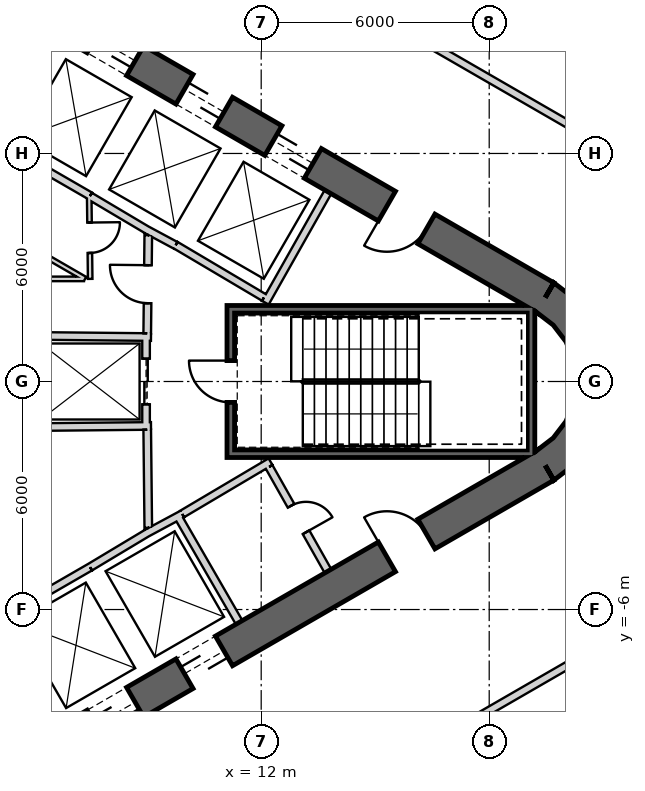
"""IFC4 building model, lengths in metres.
Left out: names, types, materials, properties, quantities, classifications, styles, units other than length and angle.
Written with IfcOpenShell. Run it as: python <this file> out.ifc"""

import sys

from ifc_helpers import new_model, si_unit, direction, frame, frame_2d, origin, place, context, subcontext, project, spatial, polyline, rectangle, outline, extrude, element, fill, save


model = new_model("IFC4")
c1 = context("Model", 3, precision=1e-05, world=origin(), true_north=direction((0.0, 1.0)))
c2 = subcontext(c1, "Body", "Model", "MODEL_VIEW")
j1 = project(units=[si_unit("LENGTHUNIT", "METRE"), si_unit("PLANEANGLEUNIT", "RADIAN")], contexts=[c1])
p1 = place(None, origin())
s1 = spatial("IfcSite", under=j1, at=p1, CompositionType="ELEMENT")
p2 = place(p1, origin())
s2 = spatial("IfcBuilding", under=s1, at=p2, CompositionType="ELEMENT")
p3 = place(p2, frame((0.0, 0.0, 107.0)))
s3 = spatial("IfcBuildingStorey", under=s2, at=p3, CompositionType="ELEMENT", Elevation=107.0)
p4 = place(p3, frame((19.475, 2.208, 0.0), z_axis=(0.0, 0.0, 1.0), x_axis=(-0.866028369851, 0.499994862586, 0.0)))
e1 = element("IfcWall", 1, at=p4, inside=s3, PredefinedType="SHEAR", context=c2, shape_type="SweptSolid", body=[
    extrude(rectangle(XDim=31.523, YDim=0.9, at=frame_2d((15.762, 0.0))), origin(), (0.0, 0.0, 1.0), 4.1),
])
p5 = place(p4, frame((7.062, 0.0, 0.0)))
e2 = element("IfcOpeningElement", 2, at=p5, cuts=e1, PredefinedType="OPENING", context=c2, shape_type="SweptSolid", body=[
    extrude(rectangle(XDim=1.2, YDim=2.4, at=frame_2d((0.6, 1.2))), frame((0.0, 0.46, 0.0), z_axis=(0.0, -1.0, 0.0), x_axis=(1.0, 0.0, 0.0)), (0.0, 0.0, 1.0), 0.92),
])
p6 = place(p4, frame((9.762, 0.0, 0.0)))
e3 = element("IfcOpeningElement", 3, at=p6, cuts=e1, PredefinedType="OPENING", context=c2, shape_type="SweptSolid", body=[
    extrude(rectangle(XDim=1.2, YDim=2.4, at=frame_2d((0.6, 1.2))), frame((0.0, 0.46, 0.0), z_axis=(0.0, -1.0, 0.0), x_axis=(1.0, 0.0, 0.0)), (0.0, 0.0, 1.0), 0.92),
])
p7 = place(p4, frame((12.462, 0.0, 0.0)))
e4 = element("IfcOpeningElement", 4, at=p7, cuts=e1, PredefinedType="OPENING", context=c2, shape_type="SweptSolid", body=[
    extrude(rectangle(XDim=1.2, YDim=2.4, at=frame_2d((0.6, 1.2))), frame((0.0, 0.46, 0.0), z_axis=(0.0, -1.0, 0.0), x_axis=(1.0, 0.0, 0.0)), (0.0, 0.0, 1.0), 0.92),
])
p8 = place(p4, frame((15.162, 0.0, 0.0)))
e5 = element("IfcOpeningElement", 5, at=p8, cuts=e1, PredefinedType="OPENING", context=c2, shape_type="SweptSolid", body=[
    extrude(rectangle(XDim=1.2, YDim=2.4, at=frame_2d((0.6, 1.2))), frame((0.0, 0.46, 0.0), z_axis=(0.0, -1.0, 0.0), x_axis=(1.0, 0.0, 0.0)), (0.0, 0.0, 1.0), 0.92),
])
p9 = place(p4, frame((17.862, 0.0, 0.0)))
e6 = element("IfcOpeningElement", 6, at=p9, cuts=e1, PredefinedType="OPENING", context=c2, shape_type="SweptSolid", body=[
    extrude(rectangle(XDim=1.2, YDim=2.4, at=frame_2d((0.6, 1.2))), frame((0.0, 0.46, 0.0), z_axis=(0.0, -1.0, 0.0), x_axis=(1.0, 0.0, 0.0)), (0.0, 0.0, 1.0), 0.92),
])
p10 = place(p4, frame((20.562, 0.0, 0.0)))
e7 = element("IfcOpeningElement", 7, at=p10, cuts=e1, PredefinedType="OPENING", context=c2, shape_type="SweptSolid", body=[
    extrude(rectangle(XDim=1.2, YDim=2.4, at=frame_2d((0.6, 1.2))), frame((0.0, 0.46, 0.0), z_axis=(0.0, -1.0, 0.0), x_axis=(1.0, 0.0, 0.0)), (0.0, 0.0, 1.0), 0.92),
])
p11 = place(p4, frame((23.262, 0.0, 0.0)))
e8 = element("IfcOpeningElement", 8, at=p11, cuts=e1, PredefinedType="OPENING", context=c2, shape_type="SweptSolid", body=[
    extrude(rectangle(XDim=1.2, YDim=2.4, at=frame_2d((0.6, 1.2))), frame((0.0, 0.46, 0.0), z_axis=(0.0, -1.0, 0.0), x_axis=(1.0, 0.0, 0.0)), (0.0, 0.0, 1.0), 0.92),
])
p12 = place(p4, frame((3.612, 0.0, 0.0)))
e9 = element("IfcOpeningElement", 9, at=p12, cuts=e1, PredefinedType="OPENING", context=c2, shape_type="SweptSolid", body=[
    extrude(rectangle(XDim=1.2, YDim=2.4, at=frame_2d((0.6, 1.2))), frame((0.0, 0.46, 0.0), z_axis=(0.0, -1.0, 0.0), x_axis=(1.0, 0.0, 0.0)), (0.0, 0.0, 1.0), 0.92),
])
p13 = place(p4, frame((26.712, 0.0, 0.0)))
e10 = element("IfcOpeningElement", 10, at=p13, cuts=e1, PredefinedType="OPENING", context=c2, shape_type="SweptSolid", body=[
    extrude(rectangle(XDim=1.2, YDim=2.4, at=frame_2d((0.6, 1.2))), frame((0.0, 0.46, 0.0), z_axis=(0.0, -1.0, 0.0), x_axis=(1.0, 0.0, 0.0)), (0.0, 0.0, 1.0), 0.92),
])
p14 = place(p3, frame((-7.825, -17.97, 0.0), z_axis=(0.0, 0.0, 1.0), x_axis=(0.866028369851, 0.499994862586, 0.0)))
e11 = element("IfcWall", 11, at=p14, inside=s3, PredefinedType="SHEAR", context=c2, shape_type="SweptSolid", body=[
    extrude(rectangle(XDim=31.523, YDim=0.9, at=frame_2d((15.762, 0.0))), origin(), (0.0, 0.0, 1.0), 4.1),
])
p15 = place(p14, frame((7.062, 0.0, 0.0)))
e12 = element("IfcOpeningElement", 12, at=p15, cuts=e11, PredefinedType="OPENING", context=c2, shape_type="SweptSolid", body=[
    extrude(rectangle(XDim=1.2, YDim=2.4, at=frame_2d((0.6, 1.2))), frame((0.0, 0.46, 0.0), z_axis=(0.0, -1.0, 0.0), x_axis=(1.0, 0.0, 0.0)), (0.0, 0.0, 1.0), 0.92),
])
p16 = place(p14, frame((9.762, 0.0, 0.0)))
e13 = element("IfcOpeningElement", 13, at=p16, cuts=e11, PredefinedType="OPENING", context=c2, shape_type="SweptSolid", body=[
    extrude(rectangle(XDim=1.2, YDim=2.4, at=frame_2d((0.6, 1.2))), frame((0.0, 0.46, 0.0), z_axis=(0.0, -1.0, 0.0), x_axis=(1.0, 0.0, 0.0)), (0.0, 0.0, 1.0), 0.92),
])
p17 = place(p14, frame((12.462, 0.0, 0.0)))
e14 = element("IfcOpeningElement", 14, at=p17, cuts=e11, PredefinedType="OPENING", context=c2, shape_type="SweptSolid", body=[
    extrude(rectangle(XDim=1.2, YDim=2.4, at=frame_2d((0.6, 1.2))), frame((0.0, 0.46, 0.0), z_axis=(0.0, -1.0, 0.0), x_axis=(1.0, 0.0, 0.0)), (0.0, 0.0, 1.0), 0.92),
])
p18 = place(p14, frame((15.162, 0.0, 0.0)))
e15 = element("IfcOpeningElement", 15, at=p18, cuts=e11, PredefinedType="OPENING", context=c2, shape_type="SweptSolid", body=[
    extrude(rectangle(XDim=1.2, YDim=2.4, at=frame_2d((0.6, 1.2))), frame((0.0, 0.46, 0.0), z_axis=(0.0, -1.0, 0.0), x_axis=(1.0, 0.0, 0.0)), (0.0, 0.0, 1.0), 0.92),
])
p19 = place(p14, frame((17.862, 0.0, 0.0)))
e16 = element("IfcOpeningElement", 16, at=p19, cuts=e11, PredefinedType="OPENING", context=c2, shape_type="SweptSolid", body=[
    extrude(rectangle(XDim=1.2, YDim=2.4, at=frame_2d((0.6, 1.2))), frame((0.0, 0.46, 0.0), z_axis=(0.0, -1.0, 0.0), x_axis=(1.0, 0.0, 0.0)), (0.0, 0.0, 1.0), 0.92),
])
p20 = place(p14, frame((20.562, 0.0, 0.0)))
e17 = element("IfcOpeningElement", 17, at=p20, cuts=e11, PredefinedType="OPENING", context=c2, shape_type="SweptSolid", body=[
    extrude(rectangle(XDim=1.2, YDim=2.4, at=frame_2d((0.6, 1.2))), frame((0.0, 0.46, 0.0), z_axis=(0.0, -1.0, 0.0), x_axis=(1.0, 0.0, 0.0)), (0.0, 0.0, 1.0), 0.92),
])
p21 = place(p14, frame((26.712, 0.0, 0.0)))
e18 = element("IfcOpeningElement", 18, at=p21, cuts=e11, PredefinedType="OPENING", context=c2, shape_type="SweptSolid", body=[
    extrude(rectangle(XDim=1.2, YDim=2.4, at=frame_2d((0.6, 1.2))), frame((0.0, 0.46, 0.0), z_axis=(0.0, -1.0, 0.0), x_axis=(1.0, 0.0, 0.0)), (0.0, 0.0, 1.0), 0.92),
])
p22 = place(p14, frame((3.612, 0.0, 0.0)))
e19 = element("IfcOpeningElement", 19, at=p22, cuts=e11, PredefinedType="OPENING", context=c2, shape_type="SweptSolid", body=[
    extrude(rectangle(XDim=1.2, YDim=2.4, at=frame_2d((0.6, 1.2))), frame((0.0, 0.46, 0.0), z_axis=(0.0, -1.0, 0.0), x_axis=(1.0, 0.0, 0.0)), (0.0, 0.0, 1.0), 0.92),
])
p23 = place(p3, origin())
e20 = element("IfcWall", 20, at=p23, inside=s3, PredefinedType="SHEAR", context=c2, shape_type="SweptSolid", body=[
    extrude(outline(polyline([(19.7, -2.598), (20.321, -2.121), (20.798, -1.5), (21.098, -0.777), (21.2, 0.0), (21.098, 0.777), (20.798, 1.5), (20.321, 2.121), (19.7, 2.598), (19.25, 1.819), (19.685, 1.485), (20.019, 1.05), (20.229, 0.543), (20.3, 0.0), (20.229, -0.543), (20.019, -1.05), (19.685, -1.485), (19.25, -1.819), (19.7, -2.598)])), origin(), (0.0, 0.0, 1.0), 4.1),
])
p24 = place(p3, frame((7.497, 4.886, 0.0), z_axis=(0.0, 0.0, 1.0), x_axis=(-0.866030989016, 0.499990325971, 0.0)))
e21 = element("IfcWall", 21, at=p24, inside=s3, PredefinedType="PLUMBINGWALL", context=c2, shape_type="SweptSolid", body=[
    extrude(rectangle(XDim=8.1, YDim=0.2, at=frame_2d((4.05, 0.0))), origin(), (0.0, 0.0, 1.0), 3.8),
])
p25 = place(p3, frame((12.11, 2.073, 0.0), z_axis=(0.0, 0.0, 1.0), x_axis=(0.49196600604, 0.870614408852, 0.0)))
e22 = element("IfcWall", 22, at=p25, inside=s3, PredefinedType="PLUMBINGWALL", context=c2, shape_type="SweptSolid", body=[
    extrude(rectangle(XDim=3.35, YDim=0.2, at=frame_2d((1.675, 0.0))), origin(), (0.0, 0.0, 1.0), 3.8),
])
p26 = place(p3, frame((12.073, 2.211, 0.0), z_axis=(0.0, 0.0, 1.0), x_axis=(-0.860438357912, 0.509554542943, 0.0)))
e23 = element("IfcWall", 23, at=p26, inside=s3, PredefinedType="PLUMBINGWALL", context=c2, shape_type="SweptSolid", body=[
    extrude(rectangle(XDim=2.7, YDim=0.2, at=frame_2d((1.35, 0.0))), origin(), (0.0, 0.0, 1.0), 3.8),
])
p27 = place(p3, frame((9.748, 3.583, 0.0), z_axis=(0.0, 0.0, 1.0), x_axis=(-0.880917147855, 0.473270513147, 0.0)))
e24 = element("IfcWall", 24, at=p27, inside=s3, PredefinedType="PLUMBINGWALL", context=c2, shape_type="SweptSolid", body=[
    extrude(rectangle(XDim=0.878, YDim=0.2, at=frame_2d((0.439, 0.0))), origin(), (0.0, 0.0, 1.0), 3.8),
])
p28 = place(p3, frame((9.08, 3.937, 0.0), z_axis=(0.0, 0.0, 1.0), x_axis=(-0.859981807212, 0.510324691999, 0.0)))
e25 = element("IfcWall", 25, at=p28, inside=s3, PredefinedType="PLUMBINGWALL", context=c2, shape_type="SweptSolid", body=[
    extrude(rectangle(XDim=1.845, YDim=0.2, at=frame_2d((0.922, 0.0))), origin(), (0.0, 0.0, 1.0), 3.8),
])
p29 = place(p3, frame((0.483, -8.936, 0.0), z_axis=(0.0, 0.0, 1.0), x_axis=(0.866030989016, 0.499990325971, 0.0)))
e26 = element("IfcWall", 26, at=p29, inside=s3, PredefinedType="PLUMBINGWALL", context=c2, shape_type="SweptSolid", body=[
    extrude(rectangle(XDim=8.1, YDim=0.2, at=frame_2d((4.05, 0.0))), origin(), (0.0, 0.0, 1.0), 3.8),
])
p30 = place(p3, frame((9.795, -3.525, 0.0), z_axis=(0.0, 0.0, 1.0), x_axis=(0.499984717929, -0.866034226713, 0.0)))
e27 = element("IfcWall", 27, at=p30, inside=s3, PredefinedType="PLUMBINGWALL", context=c2, shape_type="SweptSolid", body=[
    extrude(rectangle(XDim=3.25, YDim=0.2, at=frame_2d((1.625, 0.0))), origin(), (0.0, 0.0, 1.0), 3.8),
])
p31 = place(p3, frame((8.974, -3.999, 0.0), z_axis=(0.0, 0.0, 1.0), x_axis=(0.880907015104, 0.473289373154, 0.0)))
e28 = element("IfcWall", 28, at=p31, inside=s3, PredefinedType="PLUMBINGWALL", context=c2, shape_type="SweptSolid", body=[
    extrude(rectangle(XDim=1.078, YDim=0.2, at=frame_2d((0.539, 0.0))), origin(), (0.0, 0.0, 1.0), 3.8),
])
p32 = place(p3, frame((7.497, -4.886, 0.0), z_axis=(0.0, 0.0, 1.0), x_axis=(0.857516281273, 0.51445682749, 0.0)))
e29 = element("IfcWall", 29, at=p32, inside=s3, PredefinedType="PLUMBINGWALL", context=c2, shape_type="SweptSolid", body=[
    extrude(rectangle(XDim=1.845, YDim=0.2, at=frame_2d((0.922, 0.0))), origin(), (0.0, 0.0, 1.0), 3.8),
])
p33 = place(p3, frame((19.2, 1.9, -0.3), z_axis=(0.0, 0.0, 1.0), x_axis=(-1.0, 0.0, 0.0)))
e30 = element("IfcWall", 30, at=p33, inside=s3, PredefinedType="SHEAR", context=c2, shape_type="SweptSolid", body=[
    extrude(rectangle(XDim=8.1, YDim=0.2, at=frame_2d((4.05, 0.0))), origin(), (0.0, 0.0, 1.0), 4.1),
])
p34 = place(p3, frame((19.1, -2.0, -0.3), z_axis=(0.0, 0.0, 1.0), x_axis=(0.0, 1.0, 0.0)))
e31 = element("IfcWall", 31, at=p34, inside=s3, PredefinedType="SHEAR", context=c2, shape_type="SweptSolid", body=[
    extrude(rectangle(XDim=3.8, YDim=0.2, at=frame_2d((1.9, 0.0))), origin(), (0.0, 0.0, 1.0), 4.1),
])
p35 = place(p3, frame((11.1, -1.9, -0.3), z_axis=(0.0, 0.0, 1.0), x_axis=(1.0, 0.0, 0.0)))
e32 = element("IfcWall", 32, at=p35, inside=s3, PredefinedType="SHEAR", context=c2, shape_type="SweptSolid", body=[
    extrude(rectangle(XDim=7.9, YDim=0.2, at=frame_2d((3.95, 0.0))), origin(), (0.0, 0.0, 1.0), 4.1),
])
p36 = place(p3, frame((11.2, -1.8, -0.3), z_axis=(0.0, 0.0, 1.0), x_axis=(0.0, 1.0, 0.0)))
e33 = element("IfcWall", 33, at=p36, inside=s3, PredefinedType="SHEAR", context=c2, shape_type="SweptSolid", body=[
    extrude(rectangle(XDim=3.6, YDim=0.2, at=frame_2d((1.8, 0.0))), origin(), (0.0, 0.0, 1.0), 4.1),
])
p37 = place(p36, frame((1.25, 0.0, 0.3)))
e34 = element("IfcOpeningElement", 34, at=p37, cuts=e33, PredefinedType="OPENING", context=c2, shape_type="SweptSolid", body=[
    extrude(rectangle(XDim=1.1, YDim=2.1, at=frame_2d((0.55, 1.05))), frame((0.0, 0.11, 0.0), z_axis=(0.0, -1.0, 0.0), x_axis=(1.0, 0.0, 0.0)), (0.0, 0.0, 1.0), 0.22),
])
p38 = place(p3, frame((8.97, 1.2, 0.0), z_axis=(0.0, 0.0, 1.0), x_axis=(0.0, -1.0, 0.0)))
e35 = element("IfcWall", 35, at=p38, inside=s3, PredefinedType="PLUMBINGWALL", context=c2, shape_type="SweptSolid", body=[
    extrude(rectangle(XDim=2.4, YDim=0.2, at=frame_2d((1.2, 0.0))), origin(), (0.0, 0.0, 1.0), 3.8),
])
p39 = place(p38, frame((0.6, 0.0, 0.0)))
e36 = element("IfcOpeningElement", 36, at=p39, cuts=e35, PredefinedType="OPENING", context=c2, shape_type="SweptSolid", body=[
    extrude(rectangle(XDim=1.2, YDim=2.4, at=frame_2d((0.6, 1.2))), frame((0.0, 0.11, 0.0), z_axis=(0.0, -1.0, 0.0), x_axis=(1.0, 0.0, 0.0)), (0.0, 0.0, 1.0), 0.22),
])
p40 = place(p3, frame((9.1, -1.169, 0.0), z_axis=(0.0, 0.0, 1.0), x_axis=(-0.999949988, -0.010001074852, 0.0)))
e37 = element("IfcWall", 37, at=p40, inside=s3, PredefinedType="PLUMBINGWALL", context=c2, shape_type="SweptSolid", body=[
    extrude(rectangle(XDim=3.1, YDim=0.2, at=frame_2d((1.55, 0.0))), origin(), (0.0, 0.0, 1.0), 3.8),
])
p41 = place(p3, frame((9.1, 1.169, 0.0), z_axis=(0.0, 0.0, 1.0), x_axis=(-0.99994990606, 0.010009264196, 0.0)))
e38 = element("IfcWall", 38, at=p41, inside=s3, PredefinedType="PLUMBINGWALL", context=c2, shape_type="SweptSolid", body=[
    extrude(rectangle(XDim=3.0, YDim=0.2, at=frame_2d((1.5, 0.0))), origin(), (0.0, 0.0, 1.0), 3.8),
])
p42 = place(p3, frame((12.245, -2.109, 0.0), z_axis=(0.0, 0.0, 1.0), x_axis=(-0.860414880418, -0.509594185166, 0.0)))
e39 = element("IfcWall", 39, at=p42, inside=s3, PredefinedType="PARTITIONING", context=c2, shape_type="SweptSolid", body=[
    extrude(rectangle(XDim=2.7, YDim=0.2, at=frame_2d((1.35, 0.0))), origin(), (0.0, 0.0, 1.0), 3.8),
])
p43 = place(p3, frame((13.758, -4.99, 0.0), z_axis=(0.0, 0.0, 1.0), x_axis=(-0.491993409184, 0.87059892334, 0.0)))
e40 = element("IfcWall", 40, at=p43, inside=s3, PredefinedType="PARTITIONING", context=c2, shape_type="SweptSolid", body=[
    extrude(rectangle(XDim=3.15, YDim=0.2, at=frame_2d((1.575, 0.0))), origin(), (0.0, 0.0, 1.0), 3.8),
])
p44 = place(p43, frame((1.175, 0.0, 0.0)))
e41 = element("IfcOpeningElement", 41, at=p44, cuts=e40, PredefinedType="OPENING", context=c2, shape_type="SweptSolid", body=[
    extrude(rectangle(XDim=0.8, YDim=2.1, at=frame_2d((0.4, 1.05))), frame((0.0, 0.11, 0.0), z_axis=(0.0, -1.0, 0.0), x_axis=(1.0, 0.0, 0.0)), (0.0, 0.0, 1.0), 0.22),
])
p45 = place(p3, frame((9.029, -3.851, 0.0), z_axis=(0.0, 0.0, 1.0), x_axis=(-0.010784614026, 0.999941844359, 0.0)))
e42 = element("IfcWall", 42, at=p45, inside=s3, PredefinedType="PARTITIONING", context=c2, shape_type="SweptSolid", body=[
    extrude(rectangle(XDim=2.581, YDim=0.2, at=frame_2d((1.291, 0.0))), origin(), (0.0, 0.0, 1.0), 3.8),
])
p46 = place(p3, frame((9.001, 1.27, 0.0), z_axis=(0.0, 0.0, 1.0), x_axis=(0.010783593937, 0.99994185536, 0.0)))
e43 = element("IfcWall", 43, at=p46, inside=s3, PredefinedType="PARTITIONING", context=c2, shape_type="SweptSolid", body=[
    extrude(rectangle(XDim=2.581, YDim=0.2, at=frame_2d((1.291, 0.0))), origin(), (0.0, 0.0, 1.0), 3.8),
])
p47 = place(p46, frame((0.791, 0.0, 0.0)))
e44 = element("IfcOpeningElement", 44, at=p47, cuts=e43, PredefinedType="OPENING", context=c2, shape_type="SweptSolid", body=[
    extrude(rectangle(XDim=1.0, YDim=2.1, at=frame_2d((0.5, 1.05))), frame((0.0, 0.11, 0.0), z_axis=(0.0, -1.0, 0.0), x_axis=(1.0, 0.0, 0.0)), (0.0, 0.0, 1.0), 0.22),
])
p48 = place(p3, frame((7.367, 2.7, 0.0), z_axis=(0.0, 0.0, 1.0), x_axis=(-0.866027158831, 0.499996960157, 0.0)))
e45 = element("IfcWall", 45, at=p48, inside=s3, PredefinedType="PARTITIONING", context=c2, shape_type="SweptSolid", body=[
    extrude(rectangle(XDim=10.06, YDim=0.12, at=frame_2d((5.03, 0.0))), origin(), (0.0, 0.0, 1.0), 3.8),
])
p49 = place(p3, frame((7.5, 2.7, 0.0), z_axis=(0.0, 0.0, 1.0), x_axis=(-0.011729398337, 0.999931208241, 0.0)))
e46 = element("IfcWall", 46, at=p49, inside=s3, PredefinedType="PARTITIONING", context=c2, shape_type="SweptSolid", body=[
    extrude(rectangle(XDim=2.165, YDim=0.12, at=frame_2d((1.083, 0.0))), origin(), (0.0, 0.0, 1.0), 3.8),
])
p50 = place(p49, frame((0.682, 0.0, 0.0)))
e47 = element("IfcOpeningElement", 47, at=p50, cuts=e46, PredefinedType="OPENING", context=c2, shape_type="SweptSolid", body=[
    extrude(rectangle(XDim=0.8, YDim=2.1, at=frame_2d((0.4, 1.05))), frame((0.0, 0.07, 0.0), z_axis=(0.0, -1.0, 0.0), x_axis=(1.0, 0.0, 0.0)), (0.0, 0.0, 1.0), 0.14),
])
p51 = place(p3, frame((4.44, 2.7, 0.0), z_axis=(0.0, 0.0, 1.0), x_axis=(1.0, 0.0, 0.0)))
e48 = element("IfcWall", 48, at=p51, inside=s3, PredefinedType="PARTITIONING", context=c2, shape_type="SweptSolid", body=[
    extrude(rectangle(XDim=2.897, YDim=0.12, at=frame_2d((1.448, 0.0))), origin(), (0.0, 0.0, 1.0), 3.8),
])
p52 = place(p3, frame((22.336, 5.464, 0.0), z_axis=(0.0, 0.0, 1.0), x_axis=(-0.866027503332, 0.499996363459, 0.0)))
e49 = element("IfcWall", 49, at=p52, inside=s3, PredefinedType="PARTITIONING", context=c2, shape_type="SweptSolid", body=[
    extrude(rectangle(XDim=33.022, YDim=0.2, at=frame_2d((16.511, 0.0))), origin(), (0.0, 0.0, 1.0), 2.98),
])
p53 = place(p52, frame((16.061, 0.0, 0.0)))
e50 = element("IfcOpeningElement", 50, at=p53, cuts=e49, PredefinedType="OPENING", context=c2, shape_type="SweptSolid", body=[
    extrude(rectangle(XDim=1.0, YDim=2.1, at=frame_2d((0.5, 1.05))), frame((0.0, 0.11, 0.0), z_axis=(0.0, -1.0, 0.0), x_axis=(1.0, 0.0, 0.0)), (0.0, 0.0, 1.0), 0.22),
])
p54 = place(p3, frame((-6.227, -22.648, 0.0), z_axis=(0.0, 0.0, 1.0), x_axis=(0.866024349396, 0.50000182625, 0.0)))
e51 = element("IfcWall", 51, at=p54, inside=s3, PredefinedType="PARTITIONING", context=c2, shape_type="SweptSolid", body=[
    extrude(rectangle(XDim=33.234, YDim=0.2, at=frame_2d((16.617, 0.0))), origin(), (0.0, 0.0, 1.0), 2.98),
])
p55 = place(p54, frame((16.167, 0.0, 0.0)))
e52 = element("IfcOpeningElement", 52, at=p55, cuts=e51, PredefinedType="OPENING", context=c2, shape_type="SweptSolid", body=[
    extrude(rectangle(XDim=1.0, YDim=2.1, at=frame_2d((0.5, 1.05))), frame((0.0, 0.11, 0.0), z_axis=(0.0, -1.0, 0.0), x_axis=(1.0, 0.0, 0.0)), (0.0, 0.0, 1.0), 0.22),
])
p56 = place(p37, origin())
e53 = element("IfcDoor", 53, at=p56, inside=s3, OperationType="SINGLE_SWING_RIGHT", PredefinedType="USERDEFINED", context=c2, shape_type="SweptSolid", body=[
    extrude(rectangle(XDim=1.1, YDim=2.1, at=frame_2d((0.55, 1.05))), frame((0.0, 0.025, 0.0), z_axis=(0.0, -1.0, 0.0), x_axis=(1.0, 0.0, 0.0)), (0.0, 0.0, 1.0), 0.05),
])
fill(e34, e53)
p57 = place(p47, origin())
e54 = element("IfcDoor", 54, at=p57, inside=s3, OperationType="SINGLE_SWING_LEFT", PredefinedType="USERDEFINED", context=c2, shape_type="SweptSolid", body=[
    extrude(rectangle(XDim=1.0, YDim=2.1, at=frame_2d((0.5, 1.05))), frame((0.0, 0.025, 0.0), z_axis=(0.0, -1.0, 0.0), x_axis=(1.0, 0.0, 0.0)), (0.0, 0.0, 1.0), 0.05),
])
fill(e44, e54)
p58 = place(p39, origin())
e55 = element("IfcDoor", 55, at=p58, inside=s3, OperationType="SLIDING_TO_LEFT", PredefinedType="USERDEFINED", context=c2, shape_type="SweptSolid", body=[
    extrude(rectangle(XDim=1.2, YDim=2.4, at=frame_2d((0.6, 1.2))), frame((0.0, 0.025, 0.0), z_axis=(0.0, -1.0, 0.0), x_axis=(1.0, 0.0, 0.0)), (0.0, 0.0, 1.0), 0.05),
])
fill(e36, e55)
p59 = place(p50, origin())
e56 = element("IfcDoor", 56, at=p59, inside=s3, OperationType="SINGLE_SWING_RIGHT", PredefinedType="USERDEFINED", context=c2, shape_type="SweptSolid", body=[
    extrude(rectangle(XDim=0.8, YDim=2.1, at=frame_2d((0.4, 1.05))), frame((0.0, 0.025, 0.0), z_axis=(0.0, -1.0, 0.0), x_axis=(1.0, 0.0, 0.0)), (0.0, 0.0, 1.0), 0.05),
])
fill(e47, e56)
p60 = place(p44, origin())
e57 = element("IfcDoor", 57, at=p60, inside=s3, OperationType="SINGLE_SWING_LEFT", PredefinedType="USERDEFINED", context=c2, shape_type="SweptSolid", body=[
    extrude(rectangle(XDim=0.8, YDim=2.1, at=frame_2d((0.4, 1.05))), frame((0.0, 0.025, 0.0), z_axis=(0.0, -1.0, 0.0), x_axis=(1.0, 0.0, 0.0)), (0.0, 0.0, 1.0), 0.05),
])
fill(e41, e57)
p61 = place(p5, origin())
e58 = element("IfcDoor", 58, at=p61, inside=s3, OperationType="SLIDING_TO_LEFT", PredefinedType="USERDEFINED", context=c2, shape_type="SweptSolid", body=[
    extrude(rectangle(XDim=1.2, YDim=2.4, at=frame_2d((0.6, 1.2))), frame((0.0, 0.025, 0.0), z_axis=(0.0, -1.0, 0.0), x_axis=(1.0, 0.0, 0.0)), (0.0, 0.0, 1.0), 0.05),
])
fill(e2, e58)
p62 = place(p6, origin())
e59 = element("IfcDoor", 59, at=p62, inside=s3, OperationType="SLIDING_TO_LEFT", PredefinedType="USERDEFINED", context=c2, shape_type="SweptSolid", body=[
    extrude(rectangle(XDim=1.2, YDim=2.4, at=frame_2d((0.6, 1.2))), frame((0.0, 0.025, 0.0), z_axis=(0.0, -1.0, 0.0), x_axis=(1.0, 0.0, 0.0)), (0.0, 0.0, 1.0), 0.05),
])
fill(e3, e59)
p63 = place(p7, origin())
e60 = element("IfcDoor", 60, at=p63, inside=s3, OperationType="SLIDING_TO_LEFT", PredefinedType="USERDEFINED", context=c2, shape_type="SweptSolid", body=[
    extrude(rectangle(XDim=1.2, YDim=2.4, at=frame_2d((0.6, 1.2))), frame((0.0, 0.025, 0.0), z_axis=(0.0, -1.0, 0.0), x_axis=(1.0, 0.0, 0.0)), (0.0, 0.0, 1.0), 0.05),
])
fill(e4, e60)
p64 = place(p19, origin())
e61 = element("IfcDoor", 61, at=p64, inside=s3, OperationType="SLIDING_TO_LEFT", PredefinedType="USERDEFINED", context=c2, shape_type="SweptSolid", body=[
    extrude(rectangle(XDim=1.2, YDim=2.4, at=frame_2d((0.6, 1.2))), frame((0.0, 0.025, 0.0), z_axis=(0.0, -1.0, 0.0), x_axis=(1.0, 0.0, 0.0)), (0.0, 0.0, 1.0), 0.05),
])
fill(e16, e61)
p65 = place(p20, origin())
e62 = element("IfcDoor", 62, at=p65, inside=s3, OperationType="SLIDING_TO_LEFT", PredefinedType="USERDEFINED", context=c2, shape_type="SweptSolid", body=[
    extrude(rectangle(XDim=1.2, YDim=2.4, at=frame_2d((0.6, 1.2))), frame((0.0, 0.025, 0.0), z_axis=(0.0, -1.0, 0.0), x_axis=(1.0, 0.0, 0.0)), (0.0, 0.0, 1.0), 0.05),
])
fill(e17, e62)
p66 = place(p21, origin())
e63 = element("IfcDoor", 63, at=p66, inside=s3, OperationType="SINGLE_SWING_RIGHT", PredefinedType="USERDEFINED", context=c2, shape_type="SweptSolid", body=[
    extrude(rectangle(XDim=1.2, YDim=2.4, at=frame_2d((0.6, 1.2))), frame((0.0, 0.025, 0.0), z_axis=(0.0, -1.0, 0.0), x_axis=(1.0, 0.0, 0.0)), (0.0, 0.0, 1.0), 0.05),
])
fill(e18, e63)
p67 = place(p12, origin())
e64 = element("IfcDoor", 64, at=p67, inside=s3, OperationType="SINGLE_SWING_LEFT", PredefinedType="USERDEFINED", context=c2, shape_type="SweptSolid", body=[
    extrude(rectangle(XDim=1.2, YDim=2.4, at=frame_2d((0.6, 1.2))), frame((0.0, 0.025, 0.0), z_axis=(0.0, -1.0, 0.0), x_axis=(1.0, 0.0, 0.0)), (0.0, 0.0, 1.0), 0.05),
])
fill(e9, e64)
save(model, sys.argv[1])
